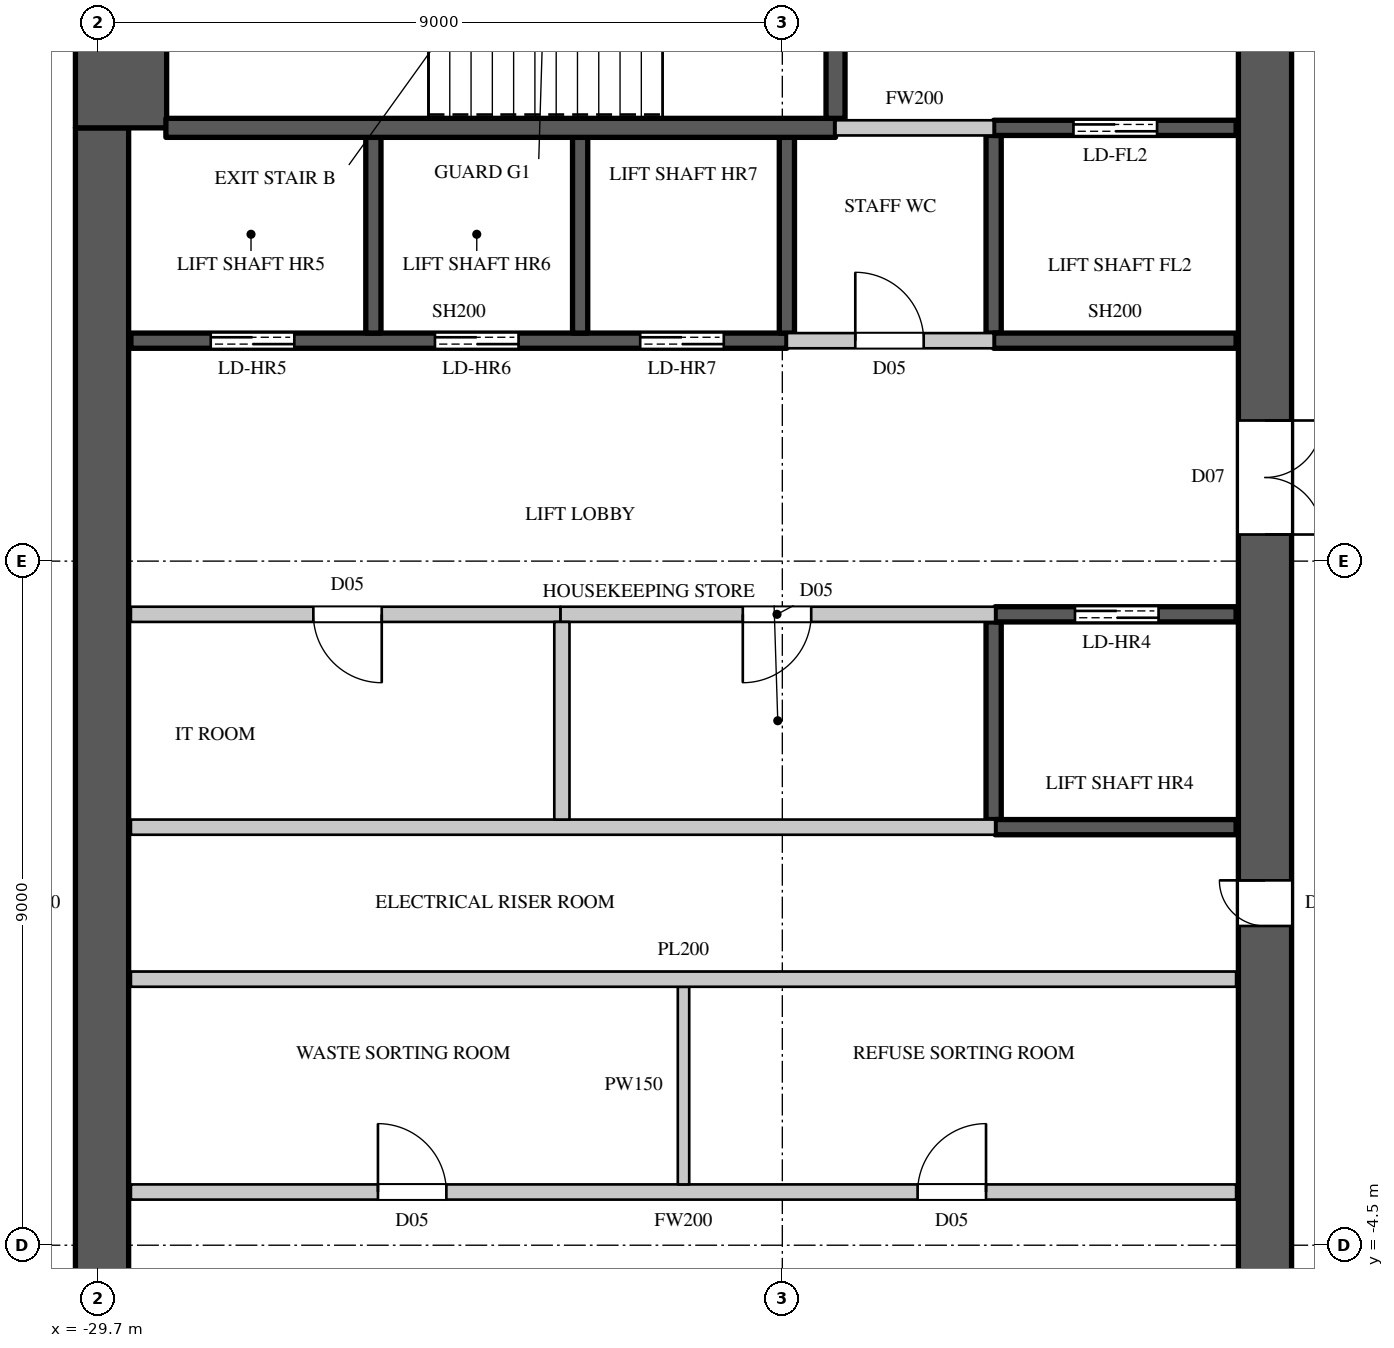
"""IFC4 building model, lengths in metres.
Left out: names, types, materials, properties, quantities, classifications, styles, units other than length and angle.
Written with IfcOpenShell. Run it as: python <this file> out.ifc"""

import sys

from ifc_helpers import new_model, si_unit, direction, frame, frame_2d, origin, place, context, subcontext, project, spatial, rectangle, extrude, element, fill, save


model = new_model("IFC4")
c1 = context("Model", 3, precision=1e-05, world=origin(), true_north=direction((0.0, 1.0)))
c2 = subcontext(c1, "Body", "Model", "MODEL_VIEW")
j1 = project(units=[si_unit("LENGTHUNIT", "METRE"), si_unit("PLANEANGLEUNIT", "RADIAN")], contexts=[c1])
p1 = place(None, origin())
s1 = spatial("IfcSite", under=j1, at=p1, CompositionType="ELEMENT")
p2 = place(p1, origin())
s2 = spatial("IfcBuilding", under=s1, at=p2, CompositionType="ELEMENT")
p3 = place(p2, frame((0.0, 0.0, 300.8)))
s3 = spatial("IfcBuildingStorey", under=s2, at=p3, CompositionType="ELEMENT", Elevation=300.8)
p4 = place(p3, frame((-14.35, -14.8, 0.0), z_axis=(0.0, 0.0, 1.0), x_axis=(0.0, 1.0, 0.0)))
e1 = element("IfcWall", 1, at=p4, inside=s3, PredefinedType="SHEAR", context=c2, shape_type="SweptSolid", body=[
    extrude(rectangle(XDim=29.6, YDim=0.7, at=frame_2d((14.8, 0.0))), origin(), (0.0, 0.0, 1.0), 4.1),
])
p5 = place(p4, frame((1.55, 0.0, 0.0)))
e2 = element("IfcOpeningElement", 2, at=p5, cuts=e1, PredefinedType="OPENING", context=c2, shape_type="SweptSolid", body=[
    extrude(rectangle(XDim=1.5, YDim=2.4, at=frame_2d((0.75, 1.2))), frame((0.0, 0.36, 0.0), z_axis=(0.0, -1.0, 0.0), x_axis=(1.0, 0.0, 0.0)), (0.0, 0.0, 1.0), 0.72),
])
p6 = place(p4, frame((26.55, 0.0, 0.0)))
e3 = element("IfcOpeningElement", 3, at=p6, cuts=e1, PredefinedType="OPENING", context=c2, shape_type="SweptSolid", body=[
    extrude(rectangle(XDim=1.5, YDim=2.4, at=frame_2d((0.75, 1.2))), frame((0.0, 0.36, 0.0), z_axis=(0.0, -1.0, 0.0), x_axis=(1.0, 0.0, 0.0)), (0.0, 0.0, 1.0), 0.72),
])
p7 = place(p4, frame((8.45, 0.0, 0.0)))
e4 = element("IfcOpeningElement", 4, at=p7, cuts=e1, PredefinedType="OPENING", context=c2, shape_type="SweptSolid", body=[
    extrude(rectangle(XDim=1.5, YDim=2.4, at=frame_2d((0.75, 1.2))), frame((0.0, 0.36, 0.0), z_axis=(0.0, -1.0, 0.0), x_axis=(1.0, 0.0, 0.0)), (0.0, 0.0, 1.0), 0.72),
])
p8 = place(p4, frame((19.65, 0.0, 0.0)))
e5 = element("IfcOpeningElement", 5, at=p8, cuts=e1, PredefinedType="OPENING", context=c2, shape_type="SweptSolid", body=[
    extrude(rectangle(XDim=1.5, YDim=2.4, at=frame_2d((0.75, 1.2))), frame((0.0, 0.36, 0.0), z_axis=(0.0, -1.0, 0.0), x_axis=(1.0, 0.0, 0.0)), (0.0, 0.0, 1.0), 0.72),
])
p9 = place(p4, frame((14.5, 0.0, 0.0)))
e6 = element("IfcOpeningElement", 6, at=p9, cuts=e1, PredefinedType="OPENING", context=c2, shape_type="SweptSolid", body=[
    extrude(rectangle(XDim=0.6, YDim=2.0, at=frame_2d((0.3, 1.0))), frame((0.0, 0.36, 0.0), z_axis=(0.0, -1.0, 0.0), x_axis=(1.0, 0.0, 0.0)), (0.0, 0.0, 1.0), 0.72),
])
p10 = place(p3, frame((-29.65, -10.2, 0.0), z_axis=(0.0, 0.0, 1.0), x_axis=(0.0, 1.0, 0.0)))
e7 = element("IfcWall", 7, at=p10, inside=s3, PredefinedType="SHEAR", context=c2, shape_type="SweptSolid", body=[
    extrude(rectangle(XDim=20.4, YDim=0.7, at=frame_2d((10.2, 0.0))), origin(), (0.0, 0.0, 1.0), 4.1),
])
p11 = place(p3, frame((-29.4, 10.2, 0.0), z_axis=(0.0, 0.0, 1.0), x_axis=(0.0, 1.0, 0.0)))
e8 = element("IfcWall", 8, at=p11, inside=s3, PredefinedType="SHEAR", context=c2, shape_type="SweptSolid", body=[
    extrude(rectangle(XDim=4.6, YDim=1.2, at=frame_2d((2.3, 0.0))), origin(), (0.0, 0.0, 1.0), 4.1),
])
p12 = place(p3, frame((-29.27, -3.8, 0.0), z_axis=(0.0, 0.0, 1.0), x_axis=(1.0, 0.0, 0.0)))
e9 = element("IfcWall", 9, at=p12, inside=s3, PredefinedType="PARTITIONING", context=c2, shape_type="SweptSolid", body=[
    extrude(rectangle(XDim=14.54, YDim=0.2, at=frame_2d((7.27, 0.0))), origin(), (0.0, 0.0, 1.0), 3.8),
])
p13 = place(p12, frame((3.25, 0.0, 0.0)))
e10 = element("IfcOpeningElement", 10, at=p13, cuts=e9, PredefinedType="OPENING", context=c2, shape_type="SweptSolid", body=[
    extrude(rectangle(XDim=0.9, YDim=2.2, at=frame_2d((0.45, 1.1))), frame((0.0, 0.11, 0.0), z_axis=(0.0, -1.0, 0.0), x_axis=(1.0, 0.0, 0.0)), (0.0, 0.0, 1.0), 0.22),
])
p14 = place(p12, frame((10.35, 0.0, 0.0)))
e11 = element("IfcOpeningElement", 11, at=p14, cuts=e9, PredefinedType="OPENING", context=c2, shape_type="SweptSolid", body=[
    extrude(rectangle(XDim=0.9, YDim=2.2, at=frame_2d((0.45, 1.1))), frame((0.0, 0.11, 0.0), z_axis=(0.0, -1.0, 0.0), x_axis=(1.0, 0.0, 0.0)), (0.0, 0.0, 1.0), 0.22),
])
p15 = place(p3, frame((-23.62, 3.8, 0.0), z_axis=(0.0, 0.0, 1.0), x_axis=(1.0, 0.0, 0.0)))
e12 = element("IfcWall", 12, at=p15, inside=s3, PredefinedType="PARTITIONING", context=c2, shape_type="SweptSolid", body=[
    extrude(rectangle(XDim=5.72, YDim=0.2, at=frame_2d((2.86, 0.0))), origin(), (0.0, 0.0, 1.0), 3.8),
])
p16 = place(p15, frame((2.4, 0.0, 0.0)))
e13 = element("IfcOpeningElement", 13, at=p16, cuts=e12, PredefinedType="OPENING", context=c2, shape_type="SweptSolid", body=[
    extrude(rectangle(XDim=0.9, YDim=2.2, at=frame_2d((0.45, 1.1))), frame((0.0, 0.11, 0.0), z_axis=(0.0, -1.0, 0.0), x_axis=(1.0, 0.0, 0.0)), (0.0, 0.0, 1.0), 0.22),
])
p17 = place(p3, frame((-20.64, 7.4, 0.0), z_axis=(0.0, 0.0, 1.0), x_axis=(1.0, 0.0, 0.0)))
e14 = element("IfcWall", 14, at=p17, inside=s3, PredefinedType="PARTITIONING", context=c2, shape_type="SweptSolid", body=[
    extrude(rectangle(XDim=2.72, YDim=0.2, at=frame_2d((1.36, 0.0))), origin(), (0.0, 0.0, 1.0), 3.8),
])
p18 = place(p17, frame((0.9, 0.0, 0.0)))
e15 = element("IfcOpeningElement", 15, at=p18, cuts=e14, PredefinedType="OPENING", context=c2, shape_type="SweptSolid", body=[
    extrude(rectangle(XDim=0.9, YDim=2.2, at=frame_2d((0.45, 1.1))), frame((0.0, 0.11, 0.0), z_axis=(0.0, -1.0, 0.0), x_axis=(1.0, 0.0, 0.0)), (0.0, 0.0, 1.0), 0.22),
])
p19 = place(p3, frame((-20.0, 10.2, 0.0), z_axis=(0.0, 0.0, 1.0), x_axis=(1.0, 0.0, 0.0)))
e16 = element("IfcWall", 16, at=p19, inside=s3, PredefinedType="PARTITIONING", context=c2, shape_type="SweptSolid", body=[
    extrude(rectangle(XDim=2.08, YDim=0.2, at=frame_2d((1.04, 0.0))), origin(), (0.0, 0.0, 1.0), 3.8),
])
p20 = place(p3, frame((-22.0, -3.7, 0.0), z_axis=(0.0, 0.0, 1.0), x_axis=(0.0, 1.0, 0.0)))
e17 = element("IfcWall", 17, at=p20, inside=s3, PredefinedType="PARTITIONING", context=c2, shape_type="SweptSolid", body=[
    extrude(rectangle(XDim=2.6, YDim=0.15, at=frame_2d((1.3, 0.0))), origin(), (0.0, 0.0, 1.0), 3.8),
])
p21 = place(p3, frame((-29.27, -1.0, 0.0), z_axis=(0.0, 0.0, 1.0), x_axis=(1.0, 0.0, 0.0)))
e18 = element("IfcWall", 18, at=p21, inside=s3, PredefinedType="PARTITIONING", context=c2, shape_type="SweptSolid", body=[
    extrude(rectangle(XDim=14.54, YDim=0.2, at=frame_2d((7.27, 0.0))), origin(), (0.0, 0.0, 1.0), 3.8),
])
p22 = place(p3, frame((-29.27, 1.0, 0.0), z_axis=(0.0, 0.0, 1.0), x_axis=(1.0, 0.0, 0.0)))
e19 = element("IfcWall", 19, at=p22, inside=s3, PredefinedType="PARTITIONING", context=c2, shape_type="SweptSolid", body=[
    extrude(rectangle(XDim=11.37, YDim=0.2, at=frame_2d((5.685, 0.0))), origin(), (0.0, 0.0, 1.0), 3.8),
])
p23 = place(p3, frame((-29.27, 3.8, 0.0), z_axis=(0.0, 0.0, 1.0), x_axis=(1.0, 0.0, 0.0)))
e20 = element("IfcWall", 20, at=p23, inside=s3, PredefinedType="PARTITIONING", context=c2, shape_type="SweptSolid", body=[
    extrude(rectangle(XDim=5.65, YDim=0.2, at=frame_2d((2.825, 0.0))), origin(), (0.0, 0.0, 1.0), 3.8),
])
p24 = place(p23, frame((2.4, 0.0, 0.0)))
e21 = element("IfcOpeningElement", 21, at=p24, cuts=e20, PredefinedType="OPENING", context=c2, shape_type="SweptSolid", body=[
    extrude(rectangle(XDim=0.9, YDim=2.2, at=frame_2d((0.45, 1.1))), frame((0.0, 0.11, 0.0), z_axis=(0.0, -1.0, 0.0), x_axis=(1.0, 0.0, 0.0)), (0.0, 0.0, 1.0), 0.22),
])
p25 = place(p3, frame((-23.6, 1.1, 0.0), z_axis=(0.0, 0.0, 1.0), x_axis=(0.0, 1.0, 0.0)))
e22 = element("IfcWall", 22, at=p25, inside=s3, PredefinedType="PARTITIONING", context=c2, shape_type="SweptSolid", body=[
    extrude(rectangle(XDim=2.6, YDim=0.2, at=frame_2d((1.3, 0.0))), origin(), (0.0, 0.0, 1.0), 3.8),
])
p26 = place(p3, frame((-29.27, 7.4, 0.0), z_axis=(0.0, 0.0, 1.0), x_axis=(1.0, 0.0, 0.0)))
e23 = element("IfcWall", 23, at=p26, inside=s3, PredefinedType="SHEAR", context=c2, shape_type="SweptSolid", body=[
    extrude(rectangle(XDim=8.63, YDim=0.2, at=frame_2d((4.315, 0.0))), origin(), (0.0, 0.0, 1.0), 3.8),
])
p27 = place(p26, frame((1.05, 0.0, 0.0)))
e24 = element("IfcOpeningElement", 24, at=p27, cuts=e23, PredefinedType="OPENING", context=c2, shape_type="SweptSolid", body=[
    extrude(rectangle(XDim=1.1, YDim=2.2, at=frame_2d((0.55, 1.1))), frame((0.0, 0.11, 0.0), z_axis=(0.0, -1.0, 0.0), x_axis=(1.0, 0.0, 0.0)), (0.0, 0.0, 1.0), 0.22),
])
p28 = place(p26, frame((4.0, 0.0, 0.0)))
e25 = element("IfcOpeningElement", 25, at=p28, cuts=e23, PredefinedType="OPENING", context=c2, shape_type="SweptSolid", body=[
    extrude(rectangle(XDim=1.1, YDim=2.2, at=frame_2d((0.55, 1.1))), frame((0.0, 0.11, 0.0), z_axis=(0.0, -1.0, 0.0), x_axis=(1.0, 0.0, 0.0)), (0.0, 0.0, 1.0), 0.22),
])
p29 = place(p26, frame((6.7, 0.0, 0.0)))
e26 = element("IfcOpeningElement", 26, at=p29, cuts=e23, PredefinedType="OPENING", context=c2, shape_type="SweptSolid", body=[
    extrude(rectangle(XDim=1.1, YDim=2.2, at=frame_2d((0.55, 1.1))), frame((0.0, 0.11, 0.0), z_axis=(0.0, -1.0, 0.0), x_axis=(1.0, 0.0, 0.0)), (0.0, 0.0, 1.0), 0.22),
])
for number, where, z_axis, x_axis in (
    (27, (-26.08, 7.5, 0.0), (0.0, 0.0, 1.0), (0.0, 1.0, 0.0)),
    (28, (-23.36, 7.5, 0.0), (0.0, 0.0, 1.0), (0.0, 1.0, 0.0)),
):
    element("IfcWall", number, at=place(p3, frame(where, z_axis=z_axis, x_axis=x_axis)), inside=s3, PredefinedType="SHEAR", context=c2, shape_type="SweptSolid", body=[
        extrude(rectangle(XDim=2.575, YDim=0.2, at=frame_2d((1.288, 0.0))), origin(), (0.0, 0.0, 1.0), 4.1),
    ])
p30 = place(p3, frame((-20.64, 7.5, 0.0), z_axis=(0.0, 0.0, 1.0), x_axis=(0.0, 1.0, 0.0)))
e29 = element("IfcWall", 29, at=p30, inside=s3, PredefinedType="SHEAR", context=c2, shape_type="SweptSolid", body=[
    extrude(rectangle(XDim=2.575, YDim=0.2, at=frame_2d((1.288, 0.0))), origin(), (0.0, 0.0, 1.0), 3.8),
])
p31 = place(p3, frame((-17.92, 1.1, 0.0), z_axis=(0.0, 0.0, 1.0), x_axis=(0.0, 1.0, 0.0)))
e30 = element("IfcWall", 30, at=p31, inside=s3, PredefinedType="SHEAR", context=c2, shape_type="SweptSolid", body=[
    extrude(rectangle(XDim=2.6, YDim=0.2, at=frame_2d((1.3, 0.0))), origin(), (0.0, 0.0, 1.0), 3.8),
])
p32 = place(p3, frame((-17.9, 1.0, 0.0), z_axis=(0.0, 0.0, 1.0), x_axis=(1.0, 0.0, 0.0)))
e31 = element("IfcWall", 31, at=p32, inside=s3, PredefinedType="SHEAR", context=c2, shape_type="SweptSolid", body=[
    extrude(rectangle(XDim=3.17, YDim=0.2, at=frame_2d((1.585, 0.0))), origin(), (0.0, 0.0, 1.0), 3.8),
])
p33 = place(p3, frame((-17.9, 3.8, 0.0), z_axis=(0.0, 0.0, 1.0), x_axis=(1.0, 0.0, 0.0)))
e32 = element("IfcWall", 32, at=p33, inside=s3, PredefinedType="SHEAR", context=c2, shape_type="SweptSolid", body=[
    extrude(rectangle(XDim=3.17, YDim=0.2, at=frame_2d((1.585, 0.0))), origin(), (0.0, 0.0, 1.0), 3.8),
])
p34 = place(p33, frame((1.05, 0.0, 0.0)))
e33 = element("IfcOpeningElement", 33, at=p34, cuts=e32, PredefinedType="OPENING", context=c2, shape_type="SweptSolid", body=[
    extrude(rectangle(XDim=1.1, YDim=2.2, at=frame_2d((0.55, 1.1))), frame((0.0, 0.11, 0.0), z_axis=(0.0, -1.0, 0.0), x_axis=(1.0, 0.0, 0.0)), (0.0, 0.0, 1.0), 0.22),
])
p35 = place(p3, frame((-17.92, 7.5, 0.0), z_axis=(0.0, 0.0, 1.0), x_axis=(0.0, 1.0, 0.0)))
e34 = element("IfcWall", 34, at=p35, inside=s3, PredefinedType="SHEAR", context=c2, shape_type="SweptSolid", body=[
    extrude(rectangle(XDim=2.6, YDim=0.2, at=frame_2d((1.3, 0.0))), origin(), (0.0, 0.0, 1.0), 3.8),
])
p36 = place(p3, frame((-17.92, 7.4, 0.0), z_axis=(0.0, 0.0, 1.0), x_axis=(1.0, 0.0, 0.0)))
e35 = element("IfcWall", 35, at=p36, inside=s3, PredefinedType="SHEAR", context=c2, shape_type="SweptSolid", body=[
    extrude(rectangle(XDim=3.19, YDim=0.2, at=frame_2d((1.595, 0.0))), origin(), (0.0, 0.0, 1.0), 3.8),
])
p37 = place(p3, frame((-17.92, 10.2, 0.0), z_axis=(0.0, 0.0, 1.0), x_axis=(1.0, 0.0, 0.0)))
e36 = element("IfcWall", 36, at=p37, inside=s3, PredefinedType="SHEAR", context=c2, shape_type="SweptSolid", body=[
    extrude(rectangle(XDim=3.19, YDim=0.2, at=frame_2d((1.595, 0.0))), origin(), (0.0, 0.0, 1.0), 3.8),
])
p38 = place(p37, frame((1.05, 0.0, 0.0)))
e37 = element("IfcOpeningElement", 37, at=p38, cuts=e36, PredefinedType="OPENING", context=c2, shape_type="SweptSolid", body=[
    extrude(rectangle(XDim=1.1, YDim=2.2, at=frame_2d((0.55, 1.1))), frame((0.0, 0.11, 0.0), z_axis=(0.0, -1.0, 0.0), x_axis=(1.0, 0.0, 0.0)), (0.0, 0.0, 1.0), 0.22),
])
p39 = place(p3, frame((-28.81, 10.2, 0.0), z_axis=(0.0, 0.0, 1.0), x_axis=(1.0, 0.0, 0.0)))
e38 = element("IfcWall", 38, at=p39, inside=s3, PredefinedType="SHEAR", context=c2, shape_type="SweptSolid", body=[
    extrude(rectangle(XDim=8.81, YDim=0.25, at=frame_2d((4.405, 0.0))), origin(), (0.0, 0.0, 1.0), 3.8),
])
p40 = place(p3, frame((-20.0, 10.325, 0.0), z_axis=(0.0, 0.0, 1.0), x_axis=(0.0, 1.0, 0.0)))
e39 = element("IfcWall", 39, at=p40, inside=s3, PredefinedType="SHEAR", context=c2, shape_type="SweptSolid", body=[
    extrude(rectangle(XDim=4.445, YDim=0.25, at=frame_2d((2.223, 0.0))), origin(), (0.0, 0.0, 1.0), 3.8),
])
p41 = place(p40, frame((1.65, 0.0, 0.0)))
e40 = element("IfcOpeningElement", 40, at=p41, cuts=e39, PredefinedType="OPENING", context=c2, shape_type="SweptSolid", body=[
    extrude(rectangle(XDim=1.1, YDim=2.2, at=frame_2d((0.55, 1.1))), frame((0.0, 0.135, 0.0), z_axis=(0.0, -1.0, 0.0), x_axis=(1.0, 0.0, 0.0)), (0.0, 0.0, 1.0), 0.27),
])
p42 = place(p13, origin())
e41 = element("IfcDoor", 41, at=p42, inside=s3, OperationType="SINGLE_SWING_LEFT", PredefinedType="DOOR", context=c2, shape_type="SweptSolid", body=[
    extrude(rectangle(XDim=0.9, YDim=2.2, at=frame_2d((0.45, 1.1))), frame((0.0, 0.025, 0.0), z_axis=(0.0, -1.0, 0.0), x_axis=(1.0, 0.0, 0.0)), (0.0, 0.0, 1.0), 0.05),
])
fill(e10, e41)
p43 = place(p14, origin())
e42 = element("IfcDoor", 42, at=p43, inside=s3, OperationType="SINGLE_SWING_RIGHT", PredefinedType="DOOR", context=c2, shape_type="SweptSolid", body=[
    extrude(rectangle(XDim=0.9, YDim=2.2, at=frame_2d((0.45, 1.1))), frame((0.0, 0.025, 0.0), z_axis=(0.0, -1.0, 0.0), x_axis=(1.0, 0.0, 0.0)), (0.0, 0.0, 1.0), 0.05),
])
fill(e11, e42)
p44 = place(p24, origin())
e43 = element("IfcDoor", 43, at=p44, inside=s3, OperationType="SINGLE_SWING_LEFT", PredefinedType="DOOR", context=c2, shape_type="SweptSolid", body=[
    extrude(rectangle(XDim=0.9, YDim=2.2, at=frame_2d((0.45, 1.1))), frame((0.0, 0.025, 0.0), z_axis=(0.0, -1.0, 0.0), x_axis=(1.0, 0.0, 0.0)), (0.0, 0.0, 1.0), 0.05),
])
fill(e21, e43)
p45 = place(p16, origin())
e44 = element("IfcDoor", 44, at=p45, inside=s3, OperationType="SINGLE_SWING_RIGHT", PredefinedType="DOOR", context=c2, shape_type="SweptSolid", body=[
    extrude(rectangle(XDim=0.9, YDim=2.2, at=frame_2d((0.45, 1.1))), frame((0.0, 0.025, 0.0), z_axis=(0.0, -1.0, 0.0), x_axis=(1.0, 0.0, 0.0)), (0.0, 0.0, 1.0), 0.05),
])
fill(e13, e44)
p46 = place(p18, origin())
e45 = element("IfcDoor", 45, at=p46, inside=s3, OperationType="SINGLE_SWING_LEFT", PredefinedType="DOOR", context=c2, shape_type="SweptSolid", body=[
    extrude(rectangle(XDim=0.9, YDim=2.2, at=frame_2d((0.45, 1.1))), frame((0.0, 0.025, 0.0), z_axis=(0.0, -1.0, 0.0), x_axis=(1.0, 0.0, 0.0)), (0.0, 0.0, 1.0), 0.05),
])
fill(e15, e45)
p47 = place(p34, origin())
e46 = element("IfcDoor", 46, at=p47, inside=s3, OperationType="DOUBLE_DOOR_SLIDING", PredefinedType="DOOR", context=c2, shape_type="SweptSolid", body=[
    extrude(rectangle(XDim=1.1, YDim=2.2, at=frame_2d((0.55, 1.1))), frame((0.0, 0.025, 0.0), z_axis=(0.0, -1.0, 0.0), x_axis=(1.0, 0.0, 0.0)), (0.0, 0.0, 1.0), 0.05),
])
fill(e33, e46)
p48 = place(p27, origin())
e47 = element("IfcDoor", 47, at=p48, inside=s3, OperationType="DOUBLE_DOOR_SLIDING", PredefinedType="DOOR", context=c2, shape_type="SweptSolid", body=[
    extrude(rectangle(XDim=1.1, YDim=2.2, at=frame_2d((0.55, 1.1))), frame((0.0, 0.025, 0.0), z_axis=(0.0, -1.0, 0.0), x_axis=(1.0, 0.0, 0.0)), (0.0, 0.0, 1.0), 0.05),
])
fill(e24, e47)
p49 = place(p28, origin())
e48 = element("IfcDoor", 48, at=p49, inside=s3, OperationType="DOUBLE_DOOR_SLIDING", PredefinedType="DOOR", context=c2, shape_type="SweptSolid", body=[
    extrude(rectangle(XDim=1.1, YDim=2.2, at=frame_2d((0.55, 1.1))), frame((0.0, 0.025, 0.0), z_axis=(0.0, -1.0, 0.0), x_axis=(1.0, 0.0, 0.0)), (0.0, 0.0, 1.0), 0.05),
])
fill(e25, e48)
p50 = place(p29, origin())
e49 = element("IfcDoor", 49, at=p50, inside=s3, OperationType="DOUBLE_DOOR_SLIDING", PredefinedType="DOOR", context=c2, shape_type="SweptSolid", body=[
    extrude(rectangle(XDim=1.1, YDim=2.2, at=frame_2d((0.55, 1.1))), frame((0.0, 0.025, 0.0), z_axis=(0.0, -1.0, 0.0), x_axis=(1.0, 0.0, 0.0)), (0.0, 0.0, 1.0), 0.05),
])
fill(e26, e49)
p51 = place(p38, origin())
e50 = element("IfcDoor", 50, at=p51, inside=s3, OperationType="DOUBLE_DOOR_SLIDING", PredefinedType="DOOR", context=c2, shape_type="SweptSolid", body=[
    extrude(rectangle(XDim=1.1, YDim=2.2, at=frame_2d((0.55, 1.1))), frame((0.0, 0.025, 0.0), z_axis=(0.0, -1.0, 0.0), x_axis=(1.0, 0.0, 0.0)), (0.0, 0.0, 1.0), 0.05),
])
fill(e37, e50)
p52 = place(p8, origin())
e51 = element("IfcDoor", 51, at=p52, inside=s3, OperationType="DOUBLE_DOOR_SINGLE_SWING", PredefinedType="DOOR", context=c2, shape_type="SweptSolid", body=[
    extrude(rectangle(XDim=1.5, YDim=2.4, at=frame_2d((0.75, 1.2))), frame((0.0, -0.295, 0.0), z_axis=(0.0, -1.0, 0.0), x_axis=(1.0, 0.0, 0.0)), (0.0, 0.0, 1.0), 0.05),
])
fill(e5, e51)
p53 = place(p9, origin())
e52 = element("IfcDoor", 52, at=p53, inside=s3, OperationType="SINGLE_SWING_RIGHT", PredefinedType="DOOR", context=c2, shape_type="SweptSolid", body=[
    extrude(rectangle(XDim=0.6, YDim=2.0, at=frame_2d((0.3, 1.0))), frame((0.0, 0.345, 0.0), z_axis=(0.0, -1.0, 0.0), x_axis=(1.0, 0.0, 0.0)), (0.0, 0.0, 1.0), 0.05),
])
fill(e6, e52)
save(model, sys.argv[1])
